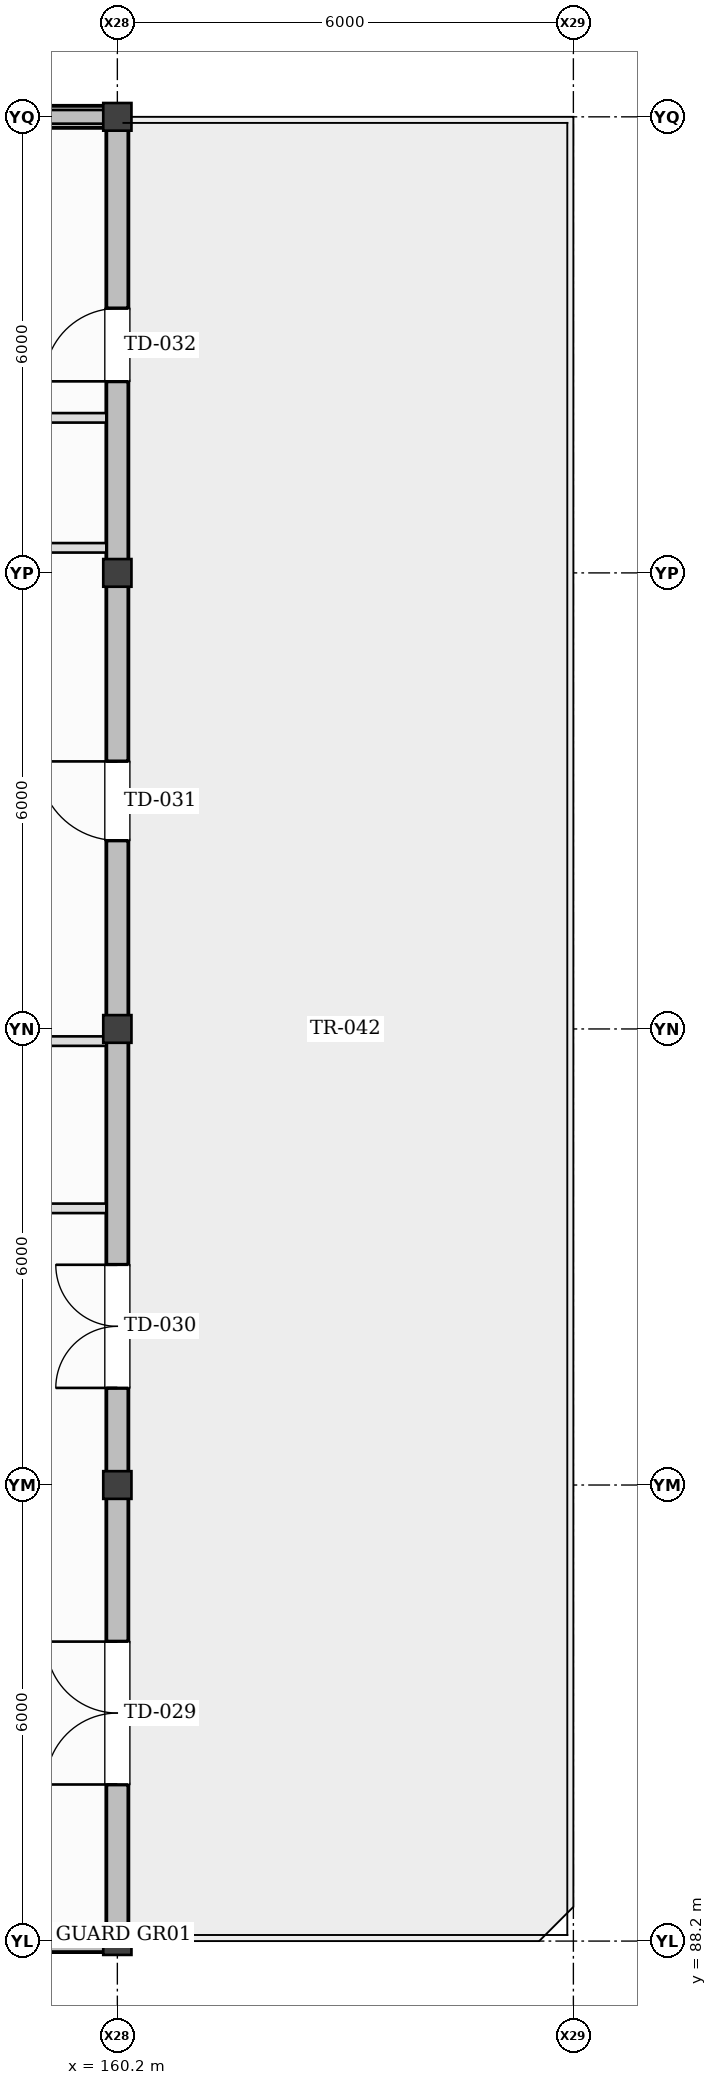
"""IFC4 building model, lengths in metres.
Left out: names, types, materials, properties, quantities, classifications, styles, units other than length and angle.
Written with IfcOpenShell. Run it as: python <this file> out.ifc"""

import sys

from ifc_helpers import new_model, si_unit, direction, frame, frame_2d, origin, origin_2d, place, context, subcontext, project, spatial, rectangle, i_section, extrude, element, fill, save


model = new_model("IFC4")
c1 = context("Model", 3, precision=1e-05, world=origin(), true_north=direction((0.0, 1.0)))
c2 = subcontext(c1, "Body", "Model", "MODEL_VIEW")
j1 = project(units=[si_unit("LENGTHUNIT", "METRE"), si_unit("PLANEANGLEUNIT", "RADIAN")], contexts=[c1])
p1 = place(None, origin())
s1 = spatial("IfcSite", under=j1, at=p1, CompositionType="ELEMENT")
p2 = place(p1, origin())
s2 = spatial("IfcBuilding", under=s1, at=p2, CompositionType="ELEMENT")
p3 = place(p2, frame((0.0, 0.0, 10.0)))
s3 = spatial("IfcBuildingStorey", under=s2, at=p3, CompositionType="ELEMENT", Elevation=10.0)
for number, where, z_axis, x_axis in (
    (1, (160.2, 88.2, 0.0), (0.0, 0.0, 1.0), (1.0, 0.0, 0.0)),
    (2, (160.2, 94.2, 0.0), (0.0, 0.0, 1.0), (1.0, 0.0, 0.0)),
    (3, (160.2, 100.2, 0.0), (0.0, 0.0, 1.0), (1.0, 0.0, 0.0)),
    (4, (160.2, 106.2, 0.0), (0.0, 0.0, 1.0), (1.0, 0.0, 0.0)),
    (5, (160.2, 112.2, 0.0), (0.0, 0.0, 1.0), (1.0, 0.0, 0.0)),
):
    element("IfcColumn", number, at=place(p3, frame(where, z_axis=z_axis, x_axis=x_axis)), inside=s3, PredefinedType="COLUMN", context=c2, shape_type="SweptSolid", body=[
        extrude(i_section(OverallWidth=0.371, OverallDepth=0.364, WebThickness=0.013, FlangeThickness=0.022, at=origin_2d()), origin(), (0.0, 0.0, 1.0), 4.0),
    ])
p4 = place(p3, frame((154.345, 88.2, 0.0), z_axis=(0.0, 0.0, 1.0), x_axis=(1.0, 0.0, 0.0)))
e6 = element("IfcWall", 6, at=p4, inside=s3, PredefinedType="STANDARD", context=c2, shape_type="SweptSolid", body=[
    extrude(rectangle(XDim=5.71, YDim=0.29, at=frame_2d((2.855, 0.0))), origin(), (0.0, 0.0, 1.0), 3.299),
])
p5 = place(p4, frame((1.93, 0.0, 1.0)))
e7 = element("IfcOpeningElement", 7, at=p5, cuts=e6, PredefinedType="OPENING", context=c2, shape_type="SweptSolid", body=[
    extrude(rectangle(XDim=1.85, YDim=1.55, at=frame_2d((0.925, 0.775))), frame((0.0, 0.155, 0.0), z_axis=(0.0, -1.0, 0.0), x_axis=(1.0, 0.0, 0.0)), (0.0, 0.0, 1.0), 0.31),
])
p6 = place(p3, frame((160.055, 112.2, 0.0), z_axis=(0.0, 0.0, 1.0), x_axis=(-1.0, 0.0, 0.0)))
e8 = element("IfcWall", 8, at=p6, inside=s3, PredefinedType="STANDARD", context=c2, shape_type="SweptSolid", body=[
    extrude(rectangle(XDim=5.71, YDim=0.29, at=frame_2d((2.855, 0.0))), origin(), (0.0, 0.0, 1.0), 0.8),
])
p7 = place(p3, frame((160.2, 88.345, 0.0), z_axis=(0.0, 0.0, 1.0), x_axis=(0.0, 1.0, 0.0)))
e9 = element("IfcWall", 9, at=p7, inside=s3, PredefinedType="STANDARD", context=c2, shape_type="SweptSolid", body=[
    extrude(rectangle(XDim=5.71, YDim=0.29, at=frame_2d((2.855, 0.0))), origin(), (0.0, 0.0, 1.0), 3.303),
])
p8 = place(p7, frame((1.915, 0.0, 0.0)))
e10 = element("IfcOpeningElement", 10, at=p8, cuts=e9, PredefinedType="OPENING", context=c2, shape_type="SweptSolid", body=[
    extrude(rectangle(XDim=1.88, YDim=2.28, at=frame_2d((0.94, 1.14))), frame((0.0, 0.155, 0.0), z_axis=(0.0, -1.0, 0.0), x_axis=(1.0, 0.0, 0.0)), (0.0, 0.0, 1.0), 0.31),
])
p9 = place(p3, frame((160.2, 94.345, 0.0), z_axis=(0.0, 0.0, 1.0), x_axis=(0.0, 1.0, 0.0)))
e11 = element("IfcWall", 11, at=p9, inside=s3, PredefinedType="STANDARD", context=c2, shape_type="SweptSolid", body=[
    extrude(rectangle(XDim=5.71, YDim=0.29, at=frame_2d((2.855, 0.0))), origin(), (0.0, 0.0, 1.0), 3.303),
])
p10 = place(p9, frame((1.133, 0.0, 0.0)))
e12 = element("IfcOpeningElement", 12, at=p10, cuts=e11, PredefinedType="OPENING", context=c2, shape_type="SweptSolid", body=[
    extrude(rectangle(XDim=1.62, YDim=2.2, at=frame_2d((0.81, 1.1))), frame((0.0, 0.155, 0.0), z_axis=(0.0, -1.0, 0.0), x_axis=(1.0, 0.0, 0.0)), (0.0, 0.0, 1.0), 0.31),
])
p11 = place(p3, frame((160.2, 100.345, 0.0), z_axis=(0.0, 0.0, 1.0), x_axis=(0.0, 1.0, 0.0)))
e13 = element("IfcWall", 13, at=p11, inside=s3, PredefinedType="STANDARD", context=c2, shape_type="SweptSolid", body=[
    extrude(rectangle(XDim=5.71, YDim=0.29, at=frame_2d((2.855, 0.0))), origin(), (0.0, 0.0, 1.0), 3.303),
])
p12 = place(p11, frame((2.335, 0.0, 0.0)))
e14 = element("IfcOpeningElement", 14, at=p12, cuts=e13, PredefinedType="OPENING", context=c2, shape_type="SweptSolid", body=[
    extrude(rectangle(XDim=1.04, YDim=2.16, at=frame_2d((0.52, 1.08))), frame((0.0, 0.155, 0.0), z_axis=(0.0, -1.0, 0.0), x_axis=(1.0, 0.0, 0.0)), (0.0, 0.0, 1.0), 0.31),
])
p13 = place(p3, frame((160.2, 106.345, 0.0), z_axis=(0.0, 0.0, 1.0), x_axis=(0.0, 1.0, 0.0)))
e15 = element("IfcWall", 15, at=p13, inside=s3, PredefinedType="STANDARD", context=c2, shape_type="SweptSolid", body=[
    extrude(rectangle(XDim=5.71, YDim=0.29, at=frame_2d((2.855, 0.0))), origin(), (0.0, 0.0, 1.0), 3.303),
])
p14 = place(p13, frame((2.375, 0.0, 0.0)))
e16 = element("IfcOpeningElement", 16, at=p14, cuts=e15, PredefinedType="OPENING", context=c2, shape_type="SweptSolid", body=[
    extrude(rectangle(XDim=0.96, YDim=2.14, at=frame_2d((0.48, 1.07))), frame((0.0, 0.155, 0.0), z_axis=(0.0, -1.0, 0.0), x_axis=(1.0, 0.0, 0.0)), (0.0, 0.0, 1.0), 0.31),
])
p15 = place(p3, frame((148.143, 97.84, 0.0), z_axis=(0.0, 0.0, 1.0), x_axis=(1.0, 0.0, 0.0)))
e17 = element("IfcWall", 17, at=p15, inside=s3, PredefinedType="PARTITIONING", context=c2, shape_type="SweptSolid", body=[
    extrude(rectangle(XDim=11.912, YDim=0.125, at=frame_2d((5.956, 0.0))), origin(), (0.0, 0.0, 1.0), 3.74),
])
p16 = place(p15, frame((5.318, 0.0, 0.0)))
e18 = element("IfcOpeningElement", 18, at=p16, cuts=e17, PredefinedType="OPENING", context=c2, shape_type="SweptSolid", body=[
    extrude(rectangle(XDim=1.5, YDim=2.22, at=frame_2d((0.75, 1.11))), frame((0.0, 0.073, 0.0), z_axis=(0.0, -1.0, 0.0), x_axis=(1.0, 0.0, 0.0)), (0.0, 0.0, 1.0), 0.145),
])
p17 = place(p3, frame((160.055, 108.24, 0.0), z_axis=(0.0, 0.0, 1.0), x_axis=(-1.0, 0.0, 0.0)))
e19 = element("IfcWall", 19, at=p17, inside=s3, PredefinedType="PARTITIONING", context=c2, shape_type="SweptSolid", body=[
    extrude(rectangle(XDim=15.552, YDim=0.125, at=frame_2d((7.776, 0.0))), origin(), (0.0, 0.0, 1.0), 3.74),
])
p18 = place(p17, frame((7.261, 0.0, 0.0)))
e20 = element("IfcOpeningElement", 20, at=p18, cuts=e19, PredefinedType="OPENING", context=c2, shape_type="SweptSolid", body=[
    extrude(rectangle(XDim=1.03, YDim=2.15, at=frame_2d((0.515, 1.075))), frame((0.0, 0.073, 0.0), z_axis=(0.0, -1.0, 0.0), x_axis=(1.0, 0.0, 0.0)), (0.0, 0.0, 1.0), 0.145),
])
p19 = place(p3, frame((157.917, 106.53, 0.0), z_axis=(0.0, 0.0, 1.0), x_axis=(1.0, 0.0, 0.0)))
e21 = element("IfcWall", 21, at=p19, inside=s3, PredefinedType="PARTITIONING", context=c2, shape_type="SweptSolid", body=[
    extrude(rectangle(XDim=2.137, YDim=0.125, at=frame_2d((1.069, 0.0))), origin(), (0.0, 0.0, 1.0), 3.299),
])
p20 = place(p19, frame((0.456, 0.0, 0.0)))
e22 = element("IfcOpeningElement", 22, at=p20, cuts=e21, PredefinedType="OPENING", context=c2, shape_type="SweptSolid", body=[
    extrude(rectangle(XDim=0.93, YDim=2.1, at=frame_2d((0.465, 1.05))), frame((0.0, 0.073, 0.0), z_axis=(0.0, -1.0, 0.0), x_axis=(1.0, 0.0, 0.0)), (0.0, 0.0, 1.0), 0.145),
])
p21 = place(p3, frame((160.055, 100.04, 0.0), z_axis=(0.0, 0.0, 1.0), x_axis=(-1.0, 0.0, 0.0)))
e23 = element("IfcWall", 23, at=p21, inside=s3, PredefinedType="PARTITIONING", context=c2, shape_type="SweptSolid", body=[
    extrude(rectangle(XDim=2.12, YDim=0.125, at=frame_2d((1.06, 0.0))), origin(), (0.0, 0.0, 1.0), 3.299),
])
p22 = place(p8, frame((1.88, 0.0, 0.0), z_axis=(0.0, 0.0, 1.0), x_axis=(-1.0, 0.0, 0.0)))
e24 = element("IfcDoor", 24, at=p22, inside=s3, OperationType="DOUBLE_DOOR_SINGLE_SWING", PredefinedType="DOOR", context=c2, shape_type="SweptSolid", body=[
    extrude(rectangle(XDim=1.88, YDim=2.28, at=frame_2d((0.94, 1.14))), frame((0.0, 0.025, 0.0), z_axis=(0.0, -1.0, 0.0), x_axis=(1.0, 0.0, 0.0)), (0.0, 0.0, 1.0), 0.05),
])
fill(e10, e24)
p23 = place(p10, frame((1.62, 0.0, 0.0), z_axis=(0.0, 0.0, 1.0), x_axis=(-1.0, 0.0, 0.0)))
e25 = element("IfcDoor", 25, at=p23, inside=s3, OperationType="DOUBLE_DOOR_SINGLE_SWING", PredefinedType="DOOR", context=c2, shape_type="SweptSolid", body=[
    extrude(rectangle(XDim=1.62, YDim=2.2, at=frame_2d((0.81, 1.1))), frame((0.0, 0.025, 0.0), z_axis=(0.0, -1.0, 0.0), x_axis=(1.0, 0.0, 0.0)), (0.0, 0.0, 1.0), 0.05),
])
fill(e12, e25)
p24 = place(p12, frame((1.04, 0.0, 0.0), z_axis=(0.0, 0.0, 1.0), x_axis=(-1.0, 0.0, 0.0)))
e26 = element("IfcDoor", 26, at=p24, inside=s3, OperationType="SINGLE_SWING_RIGHT", PredefinedType="DOOR", context=c2, shape_type="SweptSolid", body=[
    extrude(rectangle(XDim=1.04, YDim=2.16, at=frame_2d((0.52, 1.08))), frame((0.0, 0.025, 0.0), z_axis=(0.0, -1.0, 0.0), x_axis=(1.0, 0.0, 0.0)), (0.0, 0.0, 1.0), 0.05),
])
fill(e14, e26)
p25 = place(p14, frame((0.96, 0.0, 0.0), z_axis=(0.0, 0.0, 1.0), x_axis=(-1.0, 0.0, 0.0)))
e27 = element("IfcDoor", 27, at=p25, inside=s3, OperationType="SINGLE_SWING_LEFT", PredefinedType="DOOR", context=c2, shape_type="SweptSolid", body=[
    extrude(rectangle(XDim=0.96, YDim=2.14, at=frame_2d((0.48, 1.07))), frame((0.0, 0.025, 0.0), z_axis=(0.0, -1.0, 0.0), x_axis=(1.0, 0.0, 0.0)), (0.0, 0.0, 1.0), 0.05),
])
fill(e16, e27)
save(model, sys.argv[1])
